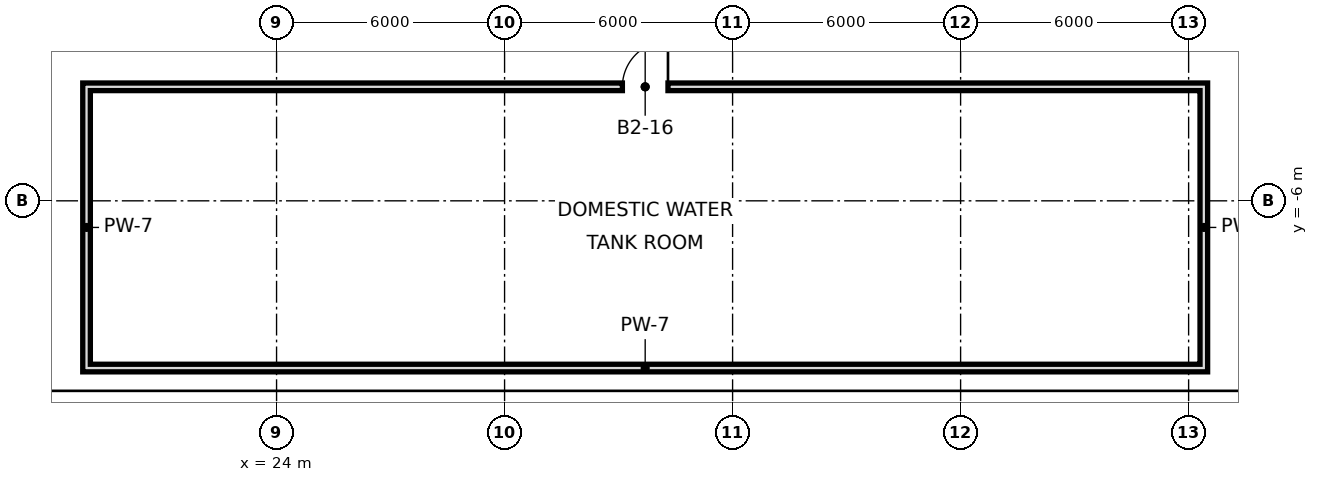
"""IFC4 building model, lengths in metres.
Left out: names, types, materials, properties, quantities, classifications, styles, units other than length and angle.
Written with IfcOpenShell. Run it as: python <this file> out.ifc"""

import sys

from ifc_helpers import new_model, si_unit, direction, frame, frame_2d, origin, place, context, subcontext, project, spatial, rectangle, extrude, element, fill, save


model = new_model("IFC4")
c1 = context("Model", 3, precision=1e-05, world=origin(), true_north=direction((0.0, 1.0)))
c2 = subcontext(c1, "Body", "Model", "MODEL_VIEW")
j1 = project(units=[si_unit("LENGTHUNIT", "METRE"), si_unit("PLANEANGLEUNIT", "RADIAN")], contexts=[c1])
p1 = place(None, origin())
s1 = spatial("IfcSite", under=j1, at=p1, CompositionType="ELEMENT")
p2 = place(p1, origin())
s2 = spatial("IfcBuilding", under=s1, at=p2, CompositionType="ELEMENT")
p3 = place(p2, frame((0.0, 0.0, -13.5)))
s3 = spatial("IfcBuildingStorey", under=s2, at=p3, CompositionType="ELEMENT", Elevation=-13.5)
p4 = place(p3, frame((-23.0, -11.5, -26.5), z_axis=(0.0, 0.0, 1.0), x_axis=(1.0, 0.0, 0.0)))
e1 = element("IfcWall", 1, at=p4, inside=s3, PredefinedType="SOLIDWALL", context=c2, shape_type="SweptSolid", body=[
    extrude(rectangle(XDim=112.0, YDim=1.0, at=frame_2d((56.0, 0.0))), origin(), (0.0, 0.0, 1.0), 39.64),
])
p5 = place(p2, frame((0.0, 0.0, -9.0)))
s4 = spatial("IfcBuildingStorey", under=s2, at=p5, CompositionType="ELEMENT", Elevation=-9.0)
for number, where, z_axis, x_axis in (
    (2, (19.0, -10.5, 0.0), (0.0, 0.0, 1.0), (0.0, 1.0, 0.0)),
    (3, (48.4, -10.5, 0.0), (0.0, 0.0, 1.0), (0.0, 1.0, 0.0)),
):
    element("IfcWall", number, at=place(p5, frame(where, z_axis=z_axis, x_axis=x_axis)), inside=s4, PredefinedType="SOLIDWALL", context=c2, shape_type="SweptSolid", body=[
        extrude(rectangle(XDim=7.6, YDim=0.2, at=frame_2d((3.8, 0.0))), origin(), (0.0, 0.0, 1.0), 4.14),
    ])
p6 = place(p5, frame((19.1, -10.4, 0.0), z_axis=(0.0, 0.0, 1.0), x_axis=(1.0, 0.0, 0.0)))
e4 = element("IfcWall", 4, at=p6, inside=s4, PredefinedType="SOLIDWALL", context=c2, shape_type="SweptSolid", body=[
    extrude(rectangle(XDim=29.2, YDim=0.2, at=frame_2d((14.6, 0.0))), origin(), (0.0, 0.0, 1.0), 4.14),
])
p7 = place(p5, frame((19.1, -3.0, 0.0), z_axis=(0.0, 0.0, 1.0), x_axis=(1.0, 0.0, 0.0)))
e5 = element("IfcWall", 5, at=p7, inside=s4, PredefinedType="SOLIDWALL", context=c2, shape_type="SweptSolid", body=[
    extrude(rectangle(XDim=29.2, YDim=0.2, at=frame_2d((14.6, 0.0))), origin(), (0.0, 0.0, 1.0), 4.14),
])
p8 = place(p7, frame((14.0, 0.0, 0.0)))
e6 = element("IfcOpeningElement", 6, at=p8, cuts=e5, PredefinedType="OPENING", context=c2, shape_type="SweptSolid", body=[
    extrude(rectangle(XDim=1.2, YDim=2.4, at=frame_2d((0.6, 1.2))), frame((0.0, 0.11, 0.0), z_axis=(0.0, -1.0, 0.0), x_axis=(1.0, 0.0, 0.0)), (0.0, 0.0, 1.0), 0.22),
])
p9 = place(p8, frame((1.2, 0.0, 0.0), z_axis=(0.0, 0.0, 1.0), x_axis=(-1.0, 0.0, 0.0)))
e7 = element("IfcDoor", 7, at=p9, inside=s4, OperationType="SINGLE_SWING_LEFT", PredefinedType="DOOR", context=c2, shape_type="SweptSolid", body=[
    extrude(rectangle(XDim=1.2, YDim=2.4, at=frame_2d((0.6, 1.2))), frame((0.0, 0.025, 0.0), z_axis=(0.0, -1.0, 0.0), x_axis=(1.0, 0.0, 0.0)), (0.0, 0.0, 1.0), 0.05),
])
fill(e6, e7)
save(model, sys.argv[1])
